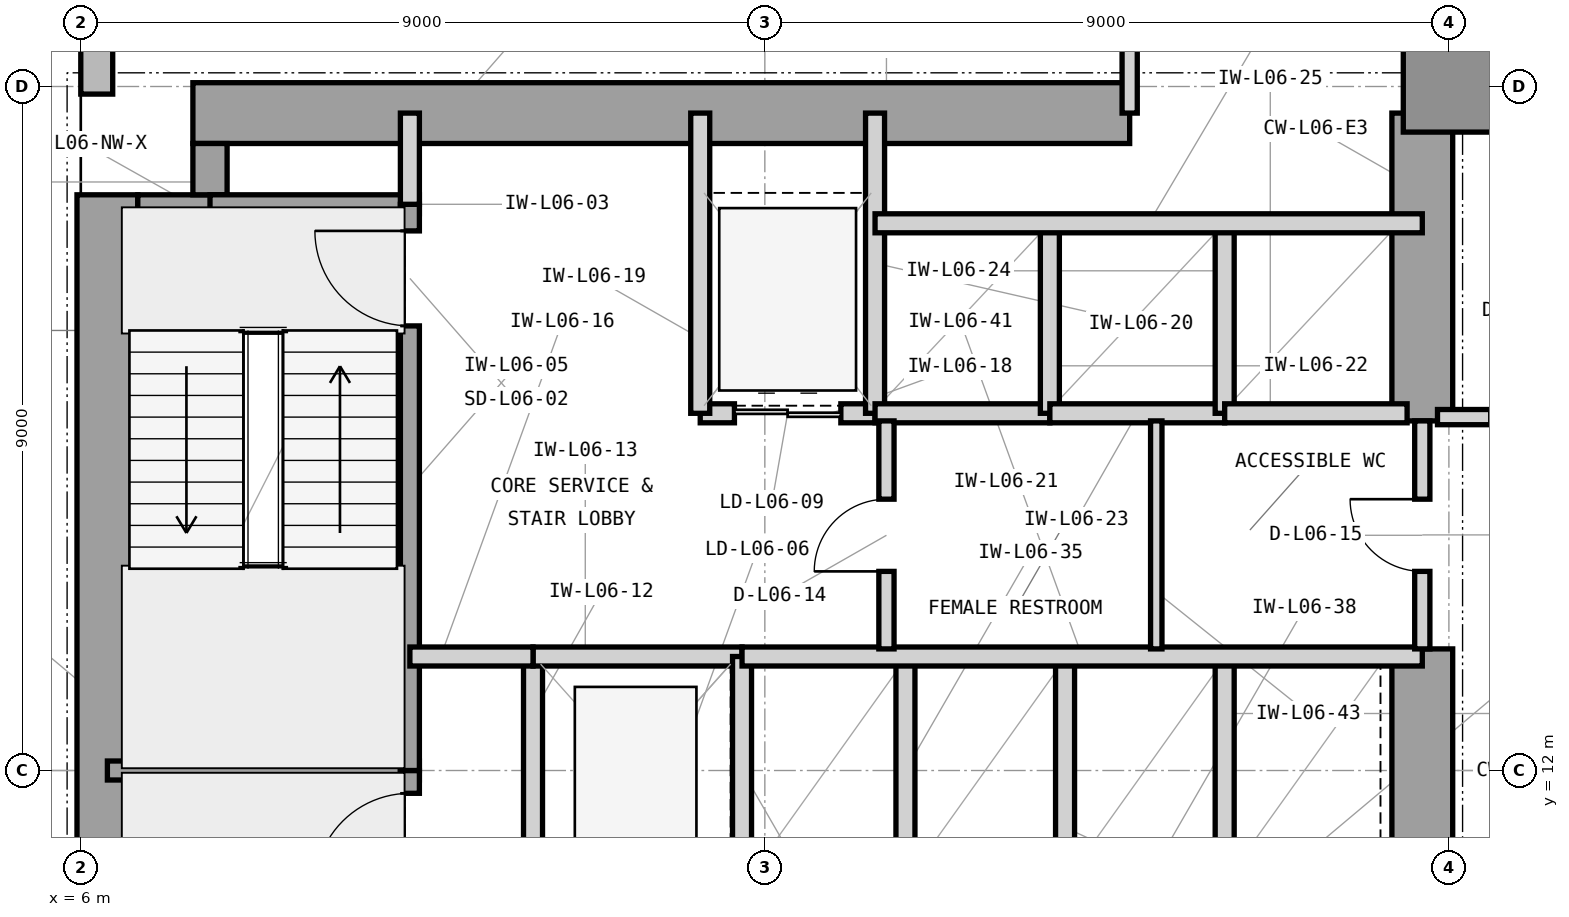
"""IFC4 building model, lengths in metres.
Left out: names, types, materials, properties, quantities, classifications, styles, units other than length and angle.
Written with IfcOpenShell. Run it as: python <this file> out.ifc"""

import sys

from ifc_helpers import new_model, si_unit, direction, frame, frame_2d, origin, origin_2d, place, context, subcontext, project, spatial, rectangle, extrude, element, fill, save


model = new_model("IFC4")
c1 = context("Model", 3, precision=1e-05, world=origin(), true_north=direction((0.0, 1.0)))
c2 = subcontext(c1, "Body", "Model", "MODEL_VIEW")
j1 = project(units=[si_unit("LENGTHUNIT", "METRE"), si_unit("PLANEANGLEUNIT", "RADIAN")], contexts=[c1])
p1 = place(None, origin())
s1 = spatial("IfcSite", under=j1, at=p1, CompositionType="ELEMENT")
p2 = place(p1, origin())
s2 = spatial("IfcBuilding", under=s1, at=p2, CompositionType="ELEMENT")
p3 = place(p2, frame((0.0, 0.0, 30.0)))
s3 = spatial("IfcBuildingStorey", under=s2, at=p3, CompositionType="ELEMENT", Elevation=30.0)
p4 = place(p3, frame((6.35, 4.425, 0.0), z_axis=(0.0, 0.0, 1.0), x_axis=(0.0, 1.0, 0.0)))
e1 = element("IfcWall", 1, at=p4, inside=s3, PredefinedType="SHEAR", context=c2, shape_type="SweptSolid", body=[
    extrude(rectangle(XDim=15.15, YDim=0.8, at=frame_2d((7.575, 0.0))), origin(), (0.0, 0.0, 1.0), 4.2),
])
p5 = place(p3, frame((7.475, 20.65, 0.0), z_axis=(0.0, 0.0, 1.0), x_axis=(1.0, 0.0, 0.0)))
e2 = element("IfcWall", 2, at=p5, inside=s3, PredefinedType="SHEAR", context=c2, shape_type="SweptSolid", body=[
    extrude(rectangle(XDim=12.325, YDim=0.8, at=frame_2d((6.163, 0.0))), origin(), (0.0, 0.0, 1.0), 4.2),
])
p6 = place(p3, frame((23.65, 10.4, 0.0), z_axis=(0.0, 0.0, 1.0), x_axis=(0.0, 1.0, 0.0)))
e3 = element("IfcWall", 3, at=p6, inside=s3, PredefinedType="SHEAR", context=c2, shape_type="SweptSolid", body=[
    extrude(rectangle(XDim=3.2, YDim=0.8, at=frame_2d((1.6, 0.0))), origin(), (0.0, 0.0, 1.0), 4.2),
])
p7 = place(p3, frame((23.65, 16.6, 0.0), z_axis=(0.0, 0.0, 1.0), x_axis=(0.0, 1.0, 0.0)))
e4 = element("IfcWall", 4, at=p7, inside=s3, PredefinedType="SHEAR", context=c2, shape_type="SweptSolid", body=[
    extrude(rectangle(XDim=4.05, YDim=0.8, at=frame_2d((2.025, 0.0))), origin(), (0.0, 0.0, 1.0), 4.2),
])
p8 = place(p3, frame((6.75, 19.35, 0.0), z_axis=(0.0, 0.0, 1.0), x_axis=(1.0, 0.0, 0.0)))
e5 = element("IfcWall", 5, at=p8, inside=s3, PredefinedType="SHEAR", context=c2, shape_type="SweptSolid", body=[
    extrude(rectangle(XDim=1.175, YDim=0.45, at=frame_2d((0.587, 0.0))), origin(), (0.0, 0.0, 1.0), 4.2),
])
p9 = place(p3, frame((7.7, 19.575, 0.0), z_axis=(0.0, 0.0, 1.0), x_axis=(0.0, 1.0, 0.0)))
e6 = element("IfcWall", 6, at=p9, inside=s3, PredefinedType="SHEAR", context=c2, shape_type="SweptSolid", body=[
    extrude(rectangle(XDim=0.675, YDim=0.45, at=frame_2d((0.337, 0.0))), origin(), (0.0, 0.0, 1.0), 4.2),
])
p10 = place(p3, frame((24.0, 21.0, 0.0), z_axis=(0.0, 0.0, 1.0), x_axis=(1.0, 0.0, 0.0)))
e7 = element("IfcColumn", 7, at=p10, inside=s3, PredefinedType="COLUMN", context=c2, shape_type="SweptSolid", body=[
    extrude(rectangle(XDim=1.2, YDim=1.2, at=origin_2d()), origin(), (0.0, 0.0, 1.0), 4.2),
])
p11 = place(p3, frame((64.4, 20.79, 0.0), z_axis=(0.0, 0.0, 1.0), x_axis=(-1.0, 0.0, 0.0)))
e8 = element("IfcWall", 8, at=p11, inside=s3, PredefinedType="STANDARD", context=c2, shape_type="SweptSolid", body=[
    extrude(rectangle(XDim=40.4, YDim=0.42, at=frame_2d((20.2, 0.0))), origin(), (0.0, 0.0, 1.0), 3.98),
])
p12 = place(p11, frame((26.375, 0.0, 0.85)))
e9 = element("IfcOpeningElement", 9, at=p12, cuts=e8, PredefinedType="OPENING", context=c2, shape_type="SweptSolid", body=[
    extrude(rectangle(XDim=2.8, YDim=2.45, at=frame_2d((1.4, 1.225))), frame((0.0, 0.22, 0.0), z_axis=(0.0, -1.0, 0.0), x_axis=(1.0, 0.0, 0.0)), (0.0, 0.0, 1.0), 0.44),
])
p13 = place(p11, frame((38.222, 0.0, 0.85)))
e10 = element("IfcOpeningElement", 10, at=p13, cuts=e8, PredefinedType="OPENING", context=c2, shape_type="SweptSolid", body=[
    extrude(rectangle(XDim=1.2, YDim=2.45, at=frame_2d((0.6, 1.225))), frame((0.0, 0.22, 0.0), z_axis=(0.0, -1.0, 0.0), x_axis=(1.0, 0.0, 0.0)), (0.0, 0.0, 1.0), 0.44),
])
p14 = place(p11, frame((32.536, 0.0, 0.85)))
e11 = element("IfcOpeningElement", 11, at=p14, cuts=e8, PredefinedType="OPENING", context=c2, shape_type="SweptSolid", body=[
    extrude(rectangle(XDim=2.8, YDim=2.45, at=frame_2d((1.4, 1.225))), frame((0.0, 0.22, 0.0), z_axis=(0.0, -1.0, 0.0), x_axis=(1.0, 0.0, 0.0)), (0.0, 0.0, 1.0), 0.44),
])
p15 = place(p11, frame((17.386, 0.0, 0.85)))
e12 = element("IfcOpeningElement", 12, at=p15, cuts=e8, PredefinedType="OPENING", context=c2, shape_type="SweptSolid", body=[
    extrude(rectangle(XDim=2.8, YDim=2.45, at=frame_2d((1.4, 1.225))), frame((0.0, 0.22, 0.0), z_axis=(0.0, -1.0, 0.0), x_axis=(1.0, 0.0, 0.0)), (0.0, 0.0, 1.0), 0.44),
])
p16 = place(p11, frame((8.436, 0.0, 0.85)))
e13 = element("IfcOpeningElement", 13, at=p16, cuts=e8, PredefinedType="OPENING", context=c2, shape_type="SweptSolid", body=[
    extrude(rectangle(XDim=1.2, YDim=2.45, at=frame_2d((0.6, 1.225))), frame((0.0, 0.22, 0.0), z_axis=(0.0, -1.0, 0.0), x_axis=(1.0, 0.0, 0.0)), (0.0, 0.0, 1.0), 0.44),
])
p17 = place(p3, frame((23.79, 21.0, 0.0), z_axis=(0.0, 0.0, 1.0), x_axis=(0.0, 1.0, 0.0)))
e14 = element("IfcWall", 14, at=p17, inside=s3, PredefinedType="STANDARD", context=c2, shape_type="SweptSolid", body=[
    extrude(rectangle(XDim=28.4, YDim=0.42, at=frame_2d((14.2, 0.0))), origin(), (0.0, 0.0, 1.0), 3.98),
])
p18 = place(p17, frame((10.433, 0.0, 0.85)))
e15 = element("IfcOpeningElement", 15, at=p18, cuts=e14, PredefinedType="OPENING", context=c2, shape_type="SweptSolid", body=[
    extrude(rectangle(XDim=2.8, YDim=2.45, at=frame_2d((1.4, 1.225))), frame((0.0, 0.22, 0.0), z_axis=(0.0, -1.0, 0.0), x_axis=(1.0, 0.0, 0.0)), (0.0, 0.0, 1.0), 0.44),
])
p19 = place(p17, frame((21.966, 0.0, 0.85)))
e16 = element("IfcOpeningElement", 16, at=p19, cuts=e14, PredefinedType="OPENING", context=c2, shape_type="SweptSolid", body=[
    extrude(rectangle(XDim=1.2, YDim=2.45, at=frame_2d((0.6, 1.225))), frame((0.0, 0.22, 0.0), z_axis=(0.0, -1.0, 0.0), x_axis=(1.0, 0.0, 0.0)), (0.0, 0.0, 1.0), 0.44),
])
p20 = place(p3, frame((6.21, 49.4, 0.0), z_axis=(0.0, 0.0, 1.0), x_axis=(0.0, -1.0, 0.0)))
e17 = element("IfcWall", 17, at=p20, inside=s3, PredefinedType="STANDARD", context=c2, shape_type="SweptSolid", body=[
    extrude(rectangle(XDim=28.5, YDim=0.42, at=frame_2d((14.25, 0.0))), origin(), (0.0, 0.0, 1.0), 3.98),
])
p21 = place(p20, frame((15.225, 0.0, 0.85)))
e18 = element("IfcOpeningElement", 18, at=p21, cuts=e17, PredefinedType="OPENING", context=c2, shape_type="SweptSolid", body=[
    extrude(rectangle(XDim=2.8, YDim=2.45, at=frame_2d((1.4, 1.225))), frame((0.0, 0.22, 0.0), z_axis=(0.0, -1.0, 0.0), x_axis=(1.0, 0.0, 0.0)), (0.0, 0.0, 1.0), 0.44),
])
p22 = place(p20, frame((5.236, 0.0, 0.85)))
e19 = element("IfcOpeningElement", 19, at=p22, cuts=e17, PredefinedType="OPENING", context=c2, shape_type="SweptSolid", body=[
    extrude(rectangle(XDim=1.2, YDim=2.45, at=frame_2d((0.6, 1.225))), frame((0.0, 0.22, 0.0), z_axis=(0.0, -1.0, 0.0), x_axis=(1.0, 0.0, 0.0)), (0.0, 0.0, 1.0), 0.44),
])
p23 = place(p3, frame((6.35, 12.0, 0.0), z_axis=(0.0, 0.0, 1.0), x_axis=(1.0, 0.0, 0.0)))
e20 = element("IfcWall", 20, at=p23, inside=s3, PredefinedType="SHEAR", context=c2, shape_type="SweptSolid", body=[
    extrude(rectangle(XDim=4.105, YDim=0.25, at=frame_2d((2.052, 0.0))), origin(), (0.0, 0.0, 1.0), 4.2),
])
p24 = place(p3, frame((7.7, 19.45, 0.0), z_axis=(0.0, 0.0, 1.0), x_axis=(1.0, 0.0, 0.0)))
e21 = element("IfcWall", 21, at=p24, inside=s3, PredefinedType="SHEAR", context=c2, shape_type="SweptSolid", body=[
    extrude(rectangle(XDim=2.755, YDim=0.25, at=frame_2d((1.377, 0.0))), origin(), (0.0, 0.0, 1.0), 4.2),
])
p25 = place(p3, frame((10.33, 4.55, 0.0), z_axis=(0.0, 0.0, 1.0), x_axis=(0.0, 1.0, 0.0)))
e22 = element("IfcWall", 22, at=p25, inside=s3, PredefinedType="SHEAR", context=c2, shape_type="SweptSolid", body=[
    extrude(rectangle(XDim=7.45, YDim=0.25, at=frame_2d((3.725, 0.0))), origin(), (0.0, 0.0, 1.0), 4.2),
])
p26 = place(p25, frame((5.9, 0.0, 0.0)))
e23 = element("IfcOpeningElement", 23, at=p26, cuts=e22, PredefinedType="OPENING", context=c2, shape_type="SweptSolid", body=[
    extrude(rectangle(XDim=1.25, YDim=2.2, at=frame_2d((0.625, 1.1))), frame((0.0, 0.135, 0.0), z_axis=(0.0, -1.0, 0.0), x_axis=(1.0, 0.0, 0.0)), (0.0, 0.0, 1.0), 0.27),
])
p27 = place(p3, frame((10.33, 12.0, 0.0), z_axis=(0.0, 0.0, 1.0), x_axis=(0.0, 1.0, 0.0)))
e24 = element("IfcWall", 24, at=p27, inside=s3, PredefinedType="SHEAR", context=c2, shape_type="SweptSolid", body=[
    extrude(rectangle(XDim=7.45, YDim=0.25, at=frame_2d((3.725, 0.0))), origin(), (0.0, 0.0, 1.0), 4.2),
])
p28 = place(p27, frame((5.85, 0.0, 0.0)))
e25 = element("IfcOpeningElement", 25, at=p28, cuts=e24, PredefinedType="OPENING", context=c2, shape_type="SweptSolid", body=[
    extrude(rectangle(XDim=1.25, YDim=2.2, at=frame_2d((0.625, 1.1))), frame((0.0, 0.135, 0.0), z_axis=(0.0, -1.0, 0.0), x_axis=(1.0, 0.0, 0.0)), (0.0, 0.0, 1.0), 0.27),
])
p29 = place(p3, frame((10.33, 19.45, 0.0), z_axis=(0.0, 0.0, 1.0), x_axis=(0.0, 1.0, 0.0)))
e26 = element("IfcWall", 26, at=p29, inside=s3, PredefinedType="PARTITIONING", context=c2, shape_type="SweptSolid", body=[
    extrude(rectangle(XDim=1.2, YDim=0.25, at=frame_2d((0.6, 0.0))), origin(), (0.0, 0.0, 1.0), 3.114),
])
p30 = place(p3, frame((11.95, 10.5, 0.0), z_axis=(0.0, 0.0, 1.0), x_axis=(0.0, 1.0, 0.0)))
e27 = element("IfcWall", 27, at=p30, inside=s3, PredefinedType="PARTITIONING", context=c2, shape_type="SweptSolid", body=[
    extrude(rectangle(XDim=3.0, YDim=0.25, at=frame_2d((1.5, 0.0))), origin(), (0.0, 0.0, 1.0), 3.97),
])
p31 = place(p3, frame((11.95, 13.5, 0.0), z_axis=(0.0, 0.0, 1.0), x_axis=(1.0, 0.0, 0.0)))
e28 = element("IfcWall", 28, at=p31, inside=s3, PredefinedType="PARTITIONING", context=c2, shape_type="SweptSolid", body=[
    extrude(rectangle(XDim=2.75, YDim=0.25, at=frame_2d((1.375, 0.0))), origin(), (0.0, 0.0, 1.0), 3.426),
])
p32 = place(p3, frame((14.7, 10.5, 0.0), z_axis=(0.0, 0.0, 1.0), x_axis=(0.0, 1.0, 0.0)))
e29 = element("IfcWall", 29, at=p32, inside=s3, PredefinedType="PARTITIONING", context=c2, shape_type="SweptSolid", body=[
    extrude(rectangle(XDim=3.0, YDim=0.25, at=frame_2d((1.5, 0.0))), origin(), (0.0, 0.0, 1.0), 3.97),
])
p33 = place(p3, frame((10.33, 13.5, 0.0), z_axis=(0.0, 0.0, 1.0), x_axis=(1.0, 0.0, 0.0)))
e30 = element("IfcWall", 30, at=p33, inside=s3, PredefinedType="PARTITIONING", context=c2, shape_type="SweptSolid", body=[
    extrude(rectangle(XDim=1.62, YDim=0.25, at=frame_2d((0.81, 0.0))), origin(), (0.0, 0.0, 1.0), 3.426),
])
p34 = place(p3, frame((14.15, 16.7, 0.0), z_axis=(0.0, 0.0, 1.0), x_axis=(1.0, 0.0, 0.0)))
e31 = element("IfcWall", 31, at=p34, inside=s3, PredefinedType="PARTITIONING", context=c2, shape_type="SweptSolid", body=[
    extrude(rectangle(XDim=2.3, YDim=0.25, at=frame_2d((1.15, 0.0))), origin(), (0.0, 0.0, 1.0), 3.426),
])
p35 = place(p34, frame((0.45, 0.0, 0.0)))
e32 = element("IfcOpeningElement", 32, at=p35, cuts=e31, PredefinedType="OPENING", context=c2, shape_type="SweptSolid", body=[
    extrude(rectangle(XDim=1.4, YDim=2.35, at=frame_2d((0.7, 1.175))), frame((0.0, 0.135, 0.0), z_axis=(0.0, -1.0, 0.0), x_axis=(1.0, 0.0, 0.0)), (0.0, 0.0, 1.0), 0.27),
])
for number, where, z_axis, x_axis in (
    (33, (14.15, 16.7, 0.0), (0.0, 0.0, 1.0), (0.0, 1.0, 0.0)),
    (34, (16.45, 16.7, 0.0), (0.0, 0.0, 1.0), (0.0, 1.0, 0.0)),
):
    element("IfcWall", number, at=place(p3, frame(where, z_axis=z_axis, x_axis=x_axis)), inside=s3, PredefinedType="PARTITIONING", context=c2, shape_type="SweptSolid", body=[
        extrude(rectangle(XDim=3.95, YDim=0.25, at=frame_2d((1.975, 0.0))), origin(), (0.0, 0.0, 1.0), 3.97),
    ])
p36 = place(p3, frame((16.45, 16.7, 0.0), z_axis=(0.0, 0.0, 1.0), x_axis=(1.0, 0.0, 0.0)))
e35 = element("IfcWall", 35, at=p36, inside=s3, PredefinedType="PARTITIONING", context=c2, shape_type="SweptSolid", body=[
    extrude(rectangle(XDim=2.3, YDim=0.25, at=frame_2d((1.15, 0.0))), origin(), (0.0, 0.0, 1.0), 3.426),
])
p37 = place(p3, frame((18.75, 16.7, 0.0), z_axis=(0.0, 0.0, 1.0), x_axis=(0.0, 1.0, 0.0)))
e36 = element("IfcWall", 36, at=p37, inside=s3, PredefinedType="PARTITIONING", context=c2, shape_type="SweptSolid", body=[
    extrude(rectangle(XDim=2.5, YDim=0.25, at=frame_2d((1.25, 0.0))), origin(), (0.0, 0.0, 1.0), 3.97),
])
p38 = place(p3, frame((18.75, 16.7, 0.0), z_axis=(0.0, 0.0, 1.0), x_axis=(1.0, 0.0, 0.0)))
e37 = element("IfcWall", 37, at=p38, inside=s3, PredefinedType="PARTITIONING", context=c2, shape_type="SweptSolid", body=[
    extrude(rectangle(XDim=2.3, YDim=0.25, at=frame_2d((1.15, 0.0))), origin(), (0.0, 0.0, 1.0), 3.426),
])
p39 = place(p3, frame((21.05, 16.7, 0.0), z_axis=(0.0, 0.0, 1.0), x_axis=(0.0, 1.0, 0.0)))
e38 = element("IfcWall", 38, at=p39, inside=s3, PredefinedType="PARTITIONING", context=c2, shape_type="SweptSolid", body=[
    extrude(rectangle(XDim=2.5, YDim=0.25, at=frame_2d((1.25, 0.0))), origin(), (0.0, 0.0, 1.0), 3.97),
])
p40 = place(p3, frame((21.05, 16.7, 0.0), z_axis=(0.0, 0.0, 1.0), x_axis=(1.0, 0.0, 0.0)))
e39 = element("IfcWall", 39, at=p40, inside=s3, PredefinedType="PARTITIONING", context=c2, shape_type="SweptSolid", body=[
    extrude(rectangle(XDim=2.4, YDim=0.25, at=frame_2d((1.2, 0.0))), origin(), (0.0, 0.0, 1.0), 3.426),
])
p41 = place(p3, frame((16.45, 19.2, 0.0), z_axis=(0.0, 0.0, 1.0), x_axis=(1.0, 0.0, 0.0)))
e40 = element("IfcWall", 40, at=p41, inside=s3, PredefinedType="PARTITIONING", context=c2, shape_type="SweptSolid", body=[
    extrude(rectangle(XDim=7.2, YDim=0.25, at=frame_2d((3.6, 0.0))), origin(), (0.0, 0.0, 1.0), 3.97),
])
for number, where, z_axis, x_axis in (
    (41, (16.85, 10.5, 0.0), (0.0, 0.0, 1.0), (0.0, 1.0, 0.0)),
    (42, (18.95, 10.5, 0.0), (0.0, 0.0, 1.0), (0.0, 1.0, 0.0)),
    (43, (21.05, 10.5, 0.0), (0.0, 0.0, 1.0), (0.0, 1.0, 0.0)),
):
    element("IfcWall", number, at=place(p3, frame(where, z_axis=z_axis, x_axis=x_axis)), inside=s3, PredefinedType="PARTITIONING", context=c2, shape_type="SweptSolid", body=[
        extrude(rectangle(XDim=3.0, YDim=0.25, at=frame_2d((1.5, 0.0))), origin(), (0.0, 0.0, 1.0), 3.97),
    ])
p42 = place(p3, frame((14.7, 13.5, 0.0), z_axis=(0.0, 0.0, 1.0), x_axis=(1.0, 0.0, 0.0)))
e44 = element("IfcWall", 44, at=p42, inside=s3, PredefinedType="PARTITIONING", context=c2, shape_type="SweptSolid", body=[
    extrude(rectangle(XDim=8.95, YDim=0.25, at=frame_2d((4.475, 0.0))), origin(), (0.0, 0.0, 1.0), 3.426),
])
p43 = place(p3, frame((16.6, 13.6, 0.0), z_axis=(0.0, 0.0, 1.0), x_axis=(0.0, 1.0, 0.0)))
e45 = element("IfcWall", 45, at=p43, inside=s3, PredefinedType="PARTITIONING", context=c2, shape_type="SweptSolid", body=[
    extrude(rectangle(XDim=3.0, YDim=0.2, at=frame_2d((1.5, 0.0))), origin(), (0.0, 0.0, 1.0), 3.97),
])
p44 = place(p43, frame((1.02, 0.0, 0.0)))
e46 = element("IfcOpeningElement", 46, at=p44, cuts=e45, PredefinedType="OPENING", context=c2, shape_type="SweptSolid", body=[
    extrude(rectangle(XDim=0.95, YDim=2.1, at=frame_2d((0.475, 1.05))), frame((0.0, 0.11, 0.0), z_axis=(0.0, -1.0, 0.0), x_axis=(1.0, 0.0, 0.0)), (0.0, 0.0, 1.0), 0.22),
])
p45 = place(p3, frame((20.15, 13.6, 0.0), z_axis=(0.0, 0.0, 1.0), x_axis=(0.0, 1.0, 0.0)))
e47 = element("IfcWall", 47, at=p45, inside=s3, PredefinedType="PARTITIONING", context=c2, shape_type="SweptSolid", body=[
    extrude(rectangle(XDim=3.0, YDim=0.15, at=frame_2d((1.5, 0.0))), origin(), (0.0, 0.0, 1.0), 3.97),
])
p46 = place(p3, frame((23.65, 13.6, 0.0), z_axis=(0.0, 0.0, 1.0), x_axis=(0.0, 1.0, 0.0)))
e48 = element("IfcWall", 48, at=p46, inside=s3, PredefinedType="PARTITIONING", context=c2, shape_type="SweptSolid", body=[
    extrude(rectangle(XDim=3.0, YDim=0.2, at=frame_2d((1.5, 0.0))), origin(), (0.0, 0.0, 1.0), 3.97),
])
p47 = place(p46, frame((1.02, 0.0, 0.0)))
e49 = element("IfcOpeningElement", 49, at=p47, cuts=e48, PredefinedType="OPENING", context=c2, shape_type="SweptSolid", body=[
    extrude(rectangle(XDim=0.95, YDim=2.1, at=frame_2d((0.475, 1.05))), frame((0.0, 0.11, 0.0), z_axis=(0.0, -1.0, 0.0), x_axis=(1.0, 0.0, 0.0)), (0.0, 0.0, 1.0), 0.22),
])
p48 = place(p3, frame((23.85, 16.65, 0.0), z_axis=(0.0, 0.0, 1.0), x_axis=(1.0, 0.0, 0.0)))
e50 = element("IfcWall", 50, at=p48, inside=s3, PredefinedType="PARTITIONING", context=c2, shape_type="SweptSolid", body=[
    extrude(rectangle(XDim=2.85, YDim=0.2, at=frame_2d((1.425, 0.0))), origin(), (0.0, 0.0, 1.0), 3.97),
])
p49 = place(p48, frame((0.7, 0.0, 0.0)))
e51 = element("IfcOpeningElement", 51, at=p49, cuts=e50, PredefinedType="OPENING", context=c2, shape_type="SweptSolid", body=[
    extrude(rectangle(XDim=1.0, YDim=2.15, at=frame_2d((0.5, 1.075))), frame((0.0, 0.11, 0.0), z_axis=(0.0, -1.0, 0.0), x_axis=(1.0, 0.0, 0.0)), (0.0, 0.0, 1.0), 0.22),
])
p50 = place(p3, frame((19.8, 20.65, 0.0), z_axis=(0.0, 0.0, 1.0), x_axis=(0.0, 1.0, 0.0)))
e52 = element("IfcWall", 52, at=p50, inside=s3, PredefinedType="PARTITIONING", context=c2, shape_type="SweptSolid", body=[
    extrude(rectangle(XDim=6.15, YDim=0.2, at=frame_2d((3.075, 0.0))), origin(), (0.0, 0.0, 1.0), 3.97),
])
p51 = place(p26, origin())
e53 = element("IfcDoor", 53, at=p51, inside=s3, OperationType="SINGLE_SWING_LEFT", PredefinedType="DOOR", context=c2, shape_type="SweptSolid", body=[
    extrude(rectangle(XDim=1.25, YDim=2.2, at=frame_2d((0.625, 1.1))), frame((0.0, 0.025, 0.0), z_axis=(0.0, -1.0, 0.0), x_axis=(1.0, 0.0, 0.0)), (0.0, 0.0, 1.0), 0.05),
])
fill(e23, e53)
p52 = place(p28, origin())
e54 = element("IfcDoor", 54, at=p52, inside=s3, OperationType="SINGLE_SWING_RIGHT", PredefinedType="DOOR", context=c2, shape_type="SweptSolid", body=[
    extrude(rectangle(XDim=1.25, YDim=2.2, at=frame_2d((0.625, 1.1))), frame((0.0, 0.025, 0.0), z_axis=(0.0, -1.0, 0.0), x_axis=(1.0, 0.0, 0.0)), (0.0, 0.0, 1.0), 0.05),
])
fill(e25, e54)
p53 = place(p35, origin())
e55 = element("IfcDoor", 55, at=p53, inside=s3, OperationType="DOUBLE_DOOR_SLIDING", PredefinedType="DOOR", context=c2, shape_type="SweptSolid", body=[
    extrude(rectangle(XDim=1.4, YDim=2.35, at=frame_2d((0.7, 1.175))), frame((0.0, 0.025, 0.0), z_axis=(0.0, -1.0, 0.0), x_axis=(1.0, 0.0, 0.0)), (0.0, 0.0, 1.0), 0.05),
])
fill(e32, e55)
p54 = place(p44, origin())
e56 = element("IfcDoor", 56, at=p54, inside=s3, OperationType="SINGLE_SWING_LEFT", PredefinedType="DOOR", context=c2, shape_type="SweptSolid", body=[
    extrude(rectangle(XDim=0.95, YDim=2.1, at=frame_2d((0.475, 1.05))), frame((0.0, 0.025, 0.0), z_axis=(0.0, -1.0, 0.0), x_axis=(1.0, 0.0, 0.0)), (0.0, 0.0, 1.0), 0.05),
])
fill(e46, e56)
p55 = place(p47, origin())
e57 = element("IfcDoor", 57, at=p55, inside=s3, OperationType="SINGLE_SWING_RIGHT", PredefinedType="DOOR", context=c2, shape_type="SweptSolid", body=[
    extrude(rectangle(XDim=0.95, YDim=2.1, at=frame_2d((0.475, 1.05))), frame((0.0, 0.025, 0.0), z_axis=(0.0, -1.0, 0.0), x_axis=(1.0, 0.0, 0.0)), (0.0, 0.0, 1.0), 0.05),
])
fill(e49, e57)
save(model, sys.argv[1])
